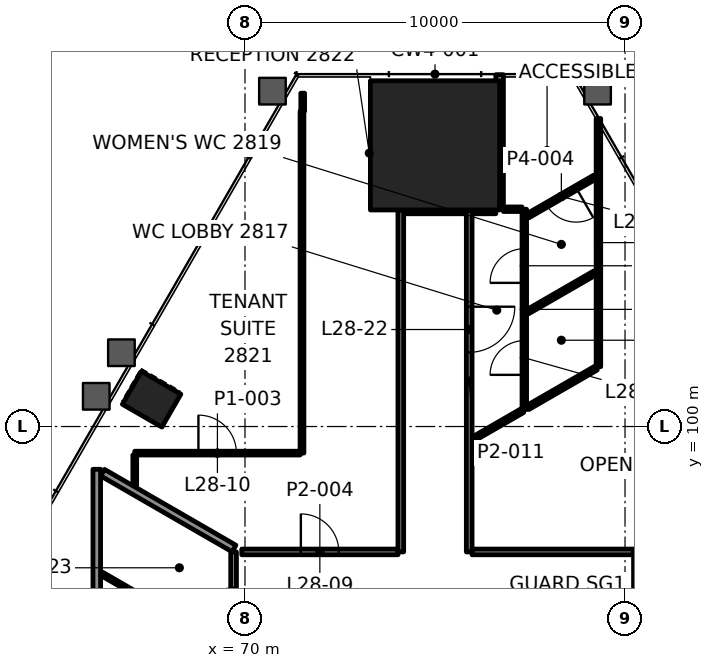
"""IFC4 building model, lengths in metres.
Left out: names, types, materials, properties, quantities, classifications, styles, units other than length and angle.
Written with IfcOpenShell. Run it as: python <this file> out.ifc"""

import sys

from ifc_helpers import new_model, si_unit, direction, frame, frame_2d, origin, origin_2d, place, context, subcontext, project, spatial, rectangle, extrude, element, fill, save


model = new_model("IFC4")
c1 = context("Model", 3, precision=1e-05, world=origin(), true_north=direction((0.0, 1.0)))
c2 = subcontext(c1, "Body", "Model", "MODEL_VIEW")
j1 = project(units=[si_unit("LENGTHUNIT", "METRE"), si_unit("PLANEANGLEUNIT", "RADIAN")], contexts=[c1])
p1 = place(None, origin())
s1 = spatial("IfcSite", under=j1, at=p1, CompositionType="ELEMENT")
p2 = place(p1, origin())
s2 = spatial("IfcBuilding", under=s1, at=p2, CompositionType="ELEMENT")
p3 = place(p2, frame((0.0, 0.0, 124.0)))
s3 = spatial("IfcBuildingStorey", under=s2, at=p3, CompositionType="ELEMENT", Elevation=124.0)
p4 = place(p3, frame((75.0, 107.399, 0.0), z_axis=(0.0, 0.0, 1.0), x_axis=(-1.0, 0.0, 0.0)))
e1 = element("IfcColumn", 1, at=p4, inside=s3, PredefinedType="COLUMN", context=c2, shape_type="SweptSolid", body=[
    extrude(rectangle(XDim=3.4, YDim=3.4, at=origin_2d()), origin(), (0.0, 0.0, 1.0), 4.2),
])
p5 = place(p3, frame((67.543, 100.719, -0.0), z_axis=(0.0, 0.0, 1.0), x_axis=(-0.5, -0.866025403784, 0.0)))
e2 = element("IfcColumn", 2, at=p5, inside=s3, PredefinedType="COLUMN", context=c2, shape_type="SweptSolid", body=[
    extrude(rectangle(XDim=1.0, YDim=1.2, at=origin_2d()), origin(), (0.0, 0.0, 1.0), 4.2),
])
p6 = place(p3, frame((69.915, 96.7, 0.0), z_axis=(0.0, 0.0, 1.0), x_axis=(1.0, 0.0, 0.0)))
e3 = element("IfcWall", 3, at=p6, inside=s3, PredefinedType="PARTITIONING", context=c2, shape_type="SweptSolid", body=[
    extrude(rectangle(XDim=4.11, YDim=0.15, at=frame_2d((2.055, 0.0))), origin(), (0.0, 0.0, 1.0), 3.4),
])
p7 = place(p6, frame((1.555, 0.0, 0.0)))
e4 = element("IfcOpeningElement", 4, at=p7, cuts=e3, PredefinedType="OPENING", context=c2, shape_type="SweptSolid", body=[
    extrude(rectangle(XDim=1.0, YDim=2.1, at=frame_2d((0.5, 1.05))), frame((0.0, 0.085, 0.0), z_axis=(0.0, -1.0, 0.0), x_axis=(1.0, 0.0, 0.0)), (0.0, 0.0, 1.0), 0.17),
])
p8 = place(p3, frame((75.975, 96.7, 0.0), z_axis=(0.0, 0.0, 1.0), x_axis=(1.0, 0.0, 0.0)))
e5 = element("IfcWall", 5, at=p8, inside=s3, PredefinedType="PARTITIONING", context=c2, shape_type="SweptSolid", body=[
    extrude(rectangle(XDim=4.249, YDim=0.15, at=frame_2d((2.125, 0.0))), origin(), (0.0, 0.0, 1.0), 3.4),
])
p9 = place(p3, frame((67.1, 99.3, 0.0), z_axis=(0.0, 0.0, 1.0), x_axis=(1.0, 0.0, 0.0)))
e6 = element("IfcWall", 6, at=p9, inside=s3, PredefinedType="PARTITIONING", context=c2, shape_type="SweptSolid", body=[
    extrude(rectangle(XDim=4.349, YDim=0.1, at=frame_2d((2.175, 0.0))), origin(), (0.0, 0.0, 1.0), 3.4),
])
p10 = place(p9, frame((1.675, 0.0, 0.0)))
e7 = element("IfcOpeningElement", 7, at=p10, cuts=e6, PredefinedType="OPENING", context=c2, shape_type="SweptSolid", body=[
    extrude(rectangle(XDim=1.0, YDim=2.1, at=frame_2d((0.5, 1.05))), frame((0.0, 0.06, 0.0), z_axis=(0.0, -1.0, 0.0), x_axis=(1.0, 0.0, 0.0)), (0.0, 0.0, 1.0), 0.12),
])
p11 = place(p3, frame((74.176, 105.699, 0.0), z_axis=(0.0, 0.0, 1.0), x_axis=(1.0, 0.0, 0.0)))
e8 = element("IfcWall", 8, at=p11, inside=s3, PredefinedType="PARTITIONING", context=c2, shape_type="SweptSolid", body=[
    extrude(rectangle(XDim=1.649, YDim=0.2, at=frame_2d((0.825, 0.0))), origin(), (0.0, 0.0, 1.0), 3.397),
])
p12 = place(p3, frame((76.8, 105.718, 0.0), z_axis=(0.0, 0.0, 1.0), x_axis=(1.0, 0.0, 0.0)))
e9 = element("IfcWall", 9, at=p12, inside=s3, PredefinedType="PARTITIONING", context=c2, shape_type="SweptSolid", body=[
    extrude(rectangle(XDim=0.49, YDim=0.12, at=frame_2d((0.245, 0.0))), origin(), (0.0, 0.0, 1.0), 3.4),
])
p13 = place(p3, frame((76.01, 99.673, 0.0), z_axis=(0.0, 0.0, 1.0), x_axis=(0.865943626461, 0.500141615736, 0.0)))
e10 = element("IfcWall", 10, at=p13, inside=s3, PredefinedType="PARTITIONING", context=c2, shape_type="SweptSolid", body=[
    extrude(rectangle(XDim=1.496, YDim=0.12, at=frame_2d((0.748, 0.0))), origin(), (0.0, 0.0, 1.0), 3.4),
])
p14 = place(p3, frame((77.445, 103.024, 0.0), z_axis=(0.0, 0.0, 1.0), x_axis=(0.866039589866, 0.499975428181, 0.0)))
e11 = element("IfcWall", 11, at=p14, inside=s3, PredefinedType="PARTITIONING", context=c2, shape_type="SweptSolid", body=[
    extrude(rectangle(XDim=2.033, YDim=0.12, at=frame_2d((1.016, 0.0))), origin(), (0.0, 0.0, 1.0), 3.4),
])
p15 = place(p3, frame((79.205, 106.562, 0.0), z_axis=(0.0, 0.0, 1.0), x_axis=(-0.866017611601, -0.500013496215, 0.0)))
e12 = element("IfcWall", 12, at=p15, inside=s3, PredefinedType="PARTITIONING", context=c2, shape_type="SweptSolid", body=[
    extrude(rectangle(XDim=2.033, YDim=0.12, at=frame_2d((1.017, 0.0))), origin(), (0.0, 0.0, 1.0), 3.4),
])
p16 = place(p15, frame((0.567, 0.0, 0.0)))
e13 = element("IfcOpeningElement", 13, at=p16, cuts=e12, PredefinedType="OPENING", context=c2, shape_type="SweptSolid", body=[
    extrude(rectangle(XDim=0.9, YDim=2.1, at=frame_2d((0.45, 1.05))), frame((0.0, 0.07, 0.0), z_axis=(0.0, -1.0, 0.0), x_axis=(1.0, 0.0, 0.0)), (0.0, 0.0, 1.0), 0.14),
])
p17 = place(p3, frame((80.3, 86.1, 0.0), z_axis=(0.0, 0.0, 1.0), x_axis=(0.0, 1.0, 0.0)))
e14 = element("IfcWall", 14, at=p17, inside=s3, PredefinedType="PARTITIONING", context=c2, shape_type="SweptSolid", body=[
    extrude(rectangle(XDim=10.599, YDim=0.15, at=frame_2d((5.3, 0.0))), origin(), (0.0, 0.0, 1.0), 3.322),
])
p18 = place(p3, frame((79.3, 101.573, 0.0), z_axis=(0.0, 0.0, 1.0), x_axis=(0.0, 1.0, 0.0)))
e15 = element("IfcWall", 15, at=p18, inside=s3, PredefinedType="PARTITIONING", context=c2, shape_type="SweptSolid", body=[
    extrude(rectangle(XDim=6.533, YDim=0.12, at=frame_2d((3.267, 0.0))), origin(), (0.0, 0.0, 1.0), 3.4),
])
p19 = place(p3, frame((77.35, 100.447, 0.0), z_axis=(0.0, 0.0, 1.0), x_axis=(0.0, 1.0, 0.0)))
e16 = element("IfcWall", 16, at=p19, inside=s3, PredefinedType="PARTITIONING", context=c2, shape_type="SweptSolid", body=[
    extrude(rectangle(XDim=5.271, YDim=0.12, at=frame_2d((2.635, 0.0))), origin(), (0.0, 0.0, 1.0), 3.4),
])
p20 = place(p19, frame((0.913, 0.0, 0.0)))
e17 = element("IfcOpeningElement", 17, at=p20, cuts=e16, PredefinedType="OPENING", context=c2, shape_type="SweptSolid", body=[
    extrude(rectangle(XDim=0.9, YDim=2.1, at=frame_2d((0.45, 1.05))), frame((0.0, 0.07, 0.0), z_axis=(0.0, -1.0, 0.0), x_axis=(1.0, 0.0, 0.0)), (0.0, 0.0, 1.0), 0.14),
])
p21 = place(p19, frame((3.333, 0.0, 0.0)))
e18 = element("IfcOpeningElement", 18, at=p21, cuts=e16, PredefinedType="OPENING", context=c2, shape_type="SweptSolid", body=[
    extrude(rectangle(XDim=0.9, YDim=2.1, at=frame_2d((0.45, 1.05))), frame((0.0, 0.07, 0.0), z_axis=(0.0, -1.0, 0.0), x_axis=(1.0, 0.0, 0.0)), (0.0, 0.0, 1.0), 0.14),
])
p22 = place(p3, frame((76.7, 105.715, 0.0), z_axis=(0.0, 0.0, 1.0), x_axis=(0.0, 1.0, 0.0)))
e19 = element("IfcWall", 19, at=p22, inside=s3, PredefinedType="PARTITIONING", context=c2, shape_type="SweptSolid", body=[
    extrude(rectangle(XDim=3.543, YDim=0.2, at=frame_2d((1.772, 0.0))), origin(), (0.0, 0.0, 1.0), 3.4),
])
p23 = place(p3, frame((75.9, 105.698, 0.0), z_axis=(0.0, 0.0, 1.0), x_axis=(0.0, -1.0, 0.0)))
e20 = element("IfcWall", 20, at=p23, inside=s3, PredefinedType="PARTITIONING", context=c2, shape_type="SweptSolid", body=[
    extrude(rectangle(XDim=8.999, YDim=0.15, at=frame_2d((4.499, 0.0))), origin(), (0.0, 0.0, 1.0), 3.4),
])
p24 = place(p23, frame((2.546, 0.0, 0.0)))
e21 = element("IfcOpeningElement", 21, at=p24, cuts=e20, PredefinedType="OPENING", context=c2, shape_type="SweptSolid", body=[
    extrude(rectangle(XDim=1.2, YDim=2.1, at=frame_2d((0.6, 1.05))), frame((0.0, 0.085, 0.0), z_axis=(0.0, -1.0, 0.0), x_axis=(1.0, 0.0, 0.0)), (0.0, 0.0, 1.0), 0.17),
])
p25 = place(p3, frame((74.1, 96.7, 0.0), z_axis=(0.0, 0.0, 1.0), x_axis=(0.0, 1.0, 0.0)))
e22 = element("IfcWall", 22, at=p25, inside=s3, PredefinedType="PARTITIONING", context=c2, shape_type="SweptSolid", body=[
    extrude(rectangle(XDim=8.998, YDim=0.15, at=frame_2d((4.499, 0.0))), origin(), (0.0, 0.0, 1.0), 3.4),
])
p26 = place(p3, frame((71.519, 108.299, 0.0), z_axis=(0.0, 0.0, 1.0), x_axis=(0.0, 1.0, 0.0)))
e23 = element("IfcWall", 23, at=p26, inside=s3, PredefinedType="PARTITIONING", context=c2, shape_type="SweptSolid", body=[
    extrude(rectangle(XDim=0.473, YDim=0.1, at=frame_2d((0.236, 0.0))), origin(), (0.0, 0.0, 1.0), 3.4),
])
p27 = place(p3, frame((71.5, 99.301, 0.0), z_axis=(0.0, 0.0, 1.0), x_axis=(0.0, 1.0, 0.0)))
e24 = element("IfcWall", 24, at=p27, inside=s3, PredefinedType="PARTITIONING", context=c2, shape_type="SweptSolid", body=[
    extrude(rectangle(XDim=8.998, YDim=0.1, at=frame_2d((4.499, 0.0))), origin(), (0.0, 0.0, 1.0), 3.4),
])
p28 = place(p3, frame((69.7, 86.1, 0.0), z_axis=(0.0, 0.0, 1.0), x_axis=(0.0, 1.0, 0.0)))
e25 = element("IfcWall", 25, at=p28, inside=s3, PredefinedType="PARTITIONING", context=c2, shape_type="SweptSolid", body=[
    extrude(rectangle(XDim=10.6, YDim=0.15, at=frame_2d((5.3, 0.0))), origin(), (0.0, 0.0, 1.0), 3.322),
])
p29 = place(p28, frame((3.555, 0.0, 0.0)))
e26 = element("IfcOpeningElement", 26, at=p29, cuts=e25, PredefinedType="OPENING", context=c2, shape_type="SweptSolid", body=[
    extrude(rectangle(XDim=0.9, YDim=2.1, at=frame_2d((0.45, 1.05))), frame((0.0, 0.085, 0.0), z_axis=(0.0, -1.0, 0.0), x_axis=(1.0, 0.0, 0.0)), (0.0, 0.0, 1.0), 0.17),
])
p30 = place(p28, frame((6.232, 0.0, 0.0)))
e27 = element("IfcOpeningElement", 27, at=p30, cuts=e25, PredefinedType="OPENING", context=c2, shape_type="SweptSolid", body=[
    extrude(rectangle(XDim=0.9, YDim=2.1, at=frame_2d((0.45, 1.05))), frame((0.0, 0.085, 0.0), z_axis=(0.0, -1.0, 0.0), x_axis=(1.0, 0.0, 0.0)), (0.0, 0.0, 1.0), 0.17),
])
p31 = place(p28, frame((8.759, 0.0, 0.0)))
e28 = element("IfcOpeningElement", 28, at=p31, cuts=e25, PredefinedType="OPENING", context=c2, shape_type="SweptSolid", body=[
    extrude(rectangle(XDim=0.9, YDim=2.1, at=frame_2d((0.45, 1.05))), frame((0.0, 0.085, 0.0), z_axis=(0.0, -1.0, 0.0), x_axis=(1.0, 0.0, 0.0)), (0.0, 0.0, 1.0), 0.17),
])
p32 = place(p3, frame((67.1, 98.443, 0.0), z_axis=(0.0, 0.0, 1.0), x_axis=(0.0, 1.0, 0.0)))
e29 = element("IfcWall", 29, at=p32, inside=s3, PredefinedType="PARTITIONING", context=c2, shape_type="SweptSolid", body=[
    extrude(rectangle(XDim=0.807, YDim=0.1, at=frame_2d((0.403, 0.0))), origin(), (0.0, 0.0, 1.0), 3.4),
])
p33 = place(p3, frame((66.1, 90.846, 0.0), z_axis=(0.0, 0.0, 1.0), x_axis=(0.0, 1.0, 0.0)))
e30 = element("IfcWall", 30, at=p33, inside=s3, PredefinedType="PARTITIONING", context=c2, shape_type="SweptSolid", body=[
    extrude(rectangle(XDim=8.029, YDim=0.2, at=frame_2d((4.014, 0.0))), origin(), (0.0, 0.0, 1.0), 3.165),
])
p34 = place(p3, frame((69.711, 96.79, 0.0), z_axis=(0.0, 0.0, 1.0), x_axis=(-0.866021621257, 0.500006551472, 0.0)))
e31 = element("IfcWall", 31, at=p34, inside=s3, PredefinedType="PARTITIONING", context=c2, shape_type="SweptSolid", body=[
    extrude(rectangle(XDim=3.992, YDim=0.2, at=frame_2d((1.996, 0.0))), origin(), (0.0, 0.0, 1.0), 3.165),
])
p35 = place(p3, frame((69.599, 94.178, 0.0), z_axis=(0.0, 0.0, 1.0), x_axis=(-0.866016482536, 0.500015451737, 0.0)))
e32 = element("IfcWall", 32, at=p35, inside=s3, PredefinedType="PARTITIONING", context=c2, shape_type="SweptSolid", body=[
    extrude(rectangle(XDim=3.895, YDim=0.1, at=frame_2d((1.948, 0.0))), origin(), (0.0, 0.0, 1.0), 3.4),
])
p36 = place(p3, frame((75.975, 105.699, 0.0), z_axis=(0.0, 0.0, 1.0), x_axis=(1.0, 0.0, 0.0)))
e33 = element("IfcWall", 33, at=p36, inside=s3, PredefinedType="PARTITIONING", context=c2, shape_type="SweptSolid", body=[
    extrude(rectangle(XDim=0.625, YDim=0.2, at=frame_2d((0.312, 0.0))), origin(), (0.0, 0.0, 1.0), 3.4),
])
p37 = place(p3, frame((77.44, 100.499, 0.0), z_axis=(0.0, 0.0, 1.0), x_axis=(0.865986040326, 0.500068173313, 0.0)))
e34 = element("IfcWall", 34, at=p37, inside=s3, PredefinedType="PARTITIONING", context=c2, shape_type="SweptSolid", body=[
    extrude(rectangle(XDim=2.078, YDim=0.12, at=frame_2d((1.039, 0.0))), origin(), (0.0, 0.0, 1.0), 3.4),
])
p38 = place(p7, origin())
e35 = element("IfcDoor", 35, at=p38, inside=s3, OperationType="SINGLE_SWING_LEFT", PredefinedType="DOOR", context=c2, shape_type="SweptSolid", body=[
    extrude(rectangle(XDim=1.0, YDim=2.1, at=frame_2d((0.5, 1.05))), frame((0.0, 0.025, 0.0), z_axis=(0.0, -1.0, 0.0), x_axis=(1.0, 0.0, 0.0)), (0.0, 0.0, 1.0), 0.05),
])
fill(e4, e35)
p39 = place(p10, origin())
e36 = element("IfcDoor", 36, at=p39, inside=s3, OperationType="SINGLE_SWING_RIGHT", PredefinedType="DOOR", context=c2, shape_type="SweptSolid", body=[
    extrude(rectangle(XDim=1.0, YDim=2.1, at=frame_2d((0.5, 1.05))), frame((0.0, 0.025, 0.0), z_axis=(0.0, -1.0, 0.0), x_axis=(1.0, 0.0, 0.0)), (0.0, 0.0, 1.0), 0.05),
])
fill(e7, e36)
p40 = place(p16, origin())
e37 = element("IfcDoor", 37, at=p40, inside=s3, OperationType="SINGLE_SWING_RIGHT", PredefinedType="DOOR", context=c2, shape_type="SweptSolid", body=[
    extrude(rectangle(XDim=0.9, YDim=2.1, at=frame_2d((0.45, 1.05))), frame((0.0, 0.025, 0.0), z_axis=(0.0, -1.0, 0.0), x_axis=(1.0, 0.0, 0.0)), (0.0, 0.0, 1.0), 0.05),
])
fill(e13, e37)
p41 = place(p20, origin())
e38 = element("IfcDoor", 38, at=p41, inside=s3, OperationType="SINGLE_SWING_LEFT", PredefinedType="DOOR", context=c2, shape_type="SweptSolid", body=[
    extrude(rectangle(XDim=0.9, YDim=2.1, at=frame_2d((0.45, 1.05))), frame((0.0, 0.025, 0.0), z_axis=(0.0, -1.0, 0.0), x_axis=(1.0, 0.0, 0.0)), (0.0, 0.0, 1.0), 0.05),
])
fill(e17, e38)
p42 = place(p21, origin())
e39 = element("IfcDoor", 39, at=p42, inside=s3, OperationType="SINGLE_SWING_RIGHT", PredefinedType="DOOR", context=c2, shape_type="SweptSolid", body=[
    extrude(rectangle(XDim=0.9, YDim=2.1, at=frame_2d((0.45, 1.05))), frame((0.0, 0.025, 0.0), z_axis=(0.0, -1.0, 0.0), x_axis=(1.0, 0.0, 0.0)), (0.0, 0.0, 1.0), 0.05),
])
fill(e18, e39)
p43 = place(p24, origin())
e40 = element("IfcDoor", 40, at=p43, inside=s3, OperationType="DOUBLE_DOOR_SINGLE_SWING", PredefinedType="DOOR", context=c2, shape_type="SweptSolid", body=[
    extrude(rectangle(XDim=1.2, YDim=2.1, at=frame_2d((0.6, 1.05))), frame((0.0, 0.025, 0.0), z_axis=(0.0, -1.0, 0.0), x_axis=(1.0, 0.0, 0.0)), (0.0, 0.0, 1.0), 0.05),
])
fill(e21, e40)
p44 = place(p31, origin())
e41 = element("IfcDoor", 41, at=p44, inside=s3, OperationType="SINGLE_SWING_RIGHT", PredefinedType="DOOR", context=c2, shape_type="SweptSolid", body=[
    extrude(rectangle(XDim=0.9, YDim=2.1, at=frame_2d((0.45, 1.05))), frame((0.0, 0.025, 0.0), z_axis=(0.0, -1.0, 0.0), x_axis=(1.0, 0.0, 0.0)), (0.0, 0.0, 1.0), 0.05),
])
fill(e28, e41)
save(model, sys.argv[1])
